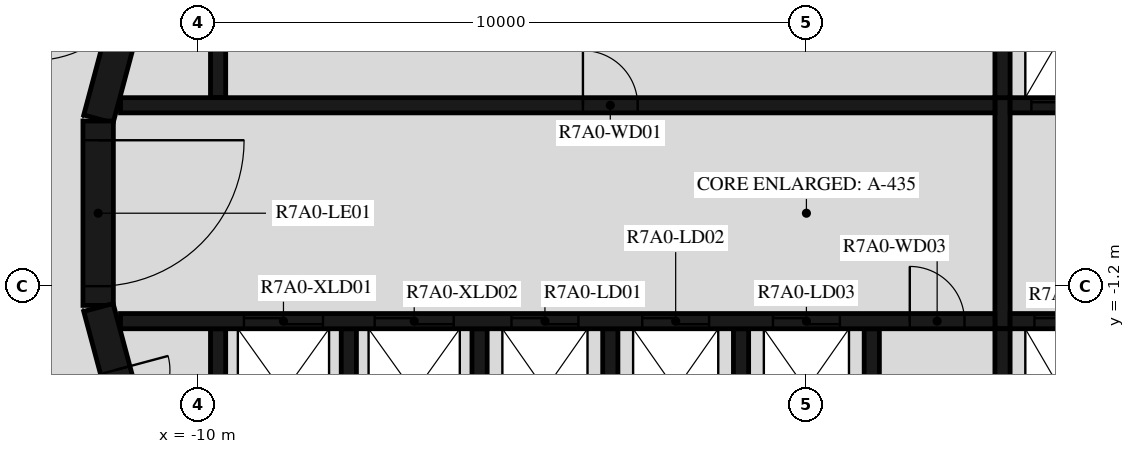
"""IFC4 building model, lengths in metres.
Left out: names, types, materials, properties, quantities, classifications, styles, units other than length and angle.
Written with IfcOpenShell. Run it as: python <this file> out.ifc"""

import sys

from ifc_helpers import new_model, si_unit, direction, frame, frame_2d, origin, place, context, subcontext, project, spatial, polyline, rectangle, outline, extrude, element, fill, save


model = new_model("IFC4")
c1 = context("Model", 3, precision=1e-05, world=origin(), true_north=direction((0.0, 1.0)))
c2 = subcontext(c1, "Body", "Model", "MODEL_VIEW")
j1 = project(units=[si_unit("LENGTHUNIT", "METRE"), si_unit("PLANEANGLEUNIT", "RADIAN")], contexts=[c1])
p1 = place(None, origin())
s1 = spatial("IfcSite", under=j1, at=p1, CompositionType="ELEMENT")
p2 = place(p1, origin())
s2 = spatial("IfcBuilding", under=s1, at=p2, CompositionType="ELEMENT")
p3 = place(p2, frame((0.0, 0.0, 263.4)))
s3 = spatial("IfcBuildingStorey", under=s2, at=p3, CompositionType="ELEMENT", Elevation=263.4)
p4 = place(p3, frame((-10.858, 4.479, 0.0), z_axis=(0.0, 0.0, 1.0), x_axis=(-0.258734743916, -0.965948410781, 0.0)))
e1 = element("IfcWall", 1, at=p4, inside=s3, PredefinedType="SHEAR", context=c2, shape_type="SweptSolid", body=[
    extrude(rectangle(XDim=3.033, YDim=0.5, at=frame_2d((1.516, 0.0))), origin(), (0.0, 0.0, 1.0), 3.12),
])
p5 = place(p3, frame((-11.647, 1.516, 0.0), z_axis=(0.0, 0.0, 1.0), x_axis=(0.0, -1.0, 0.0)))
e2 = element("IfcWall", 2, at=p5, inside=s3, PredefinedType="SHEAR", context=c2, shape_type="SweptSolid", body=[
    extrude(rectangle(XDim=3.033, YDim=0.5, at=frame_2d((1.516, 0.0))), origin(), (0.0, 0.0, 1.0), 3.12),
])
p6 = place(p5, frame((0.316, 0.0, 0.0)))
e3 = element("IfcOpeningElement", 3, at=p6, cuts=e2, PredefinedType="OPENING", context=c2, shape_type="SweptSolid", body=[
    extrude(rectangle(XDim=2.4, YDim=2.1, at=frame_2d((1.2, 1.05))), frame((0.0, 0.26, 0.0), z_axis=(0.0, -1.0, 0.0), x_axis=(1.0, 0.0, 0.0)), (0.0, 0.0, 1.0), 0.52),
])
p7 = place(p3, frame((-11.643, -1.55, 0.0), z_axis=(0.0, 0.0, 1.0), x_axis=(0.258734743916, -0.965948410781, 0.0)))
e4 = element("IfcWall", 4, at=p7, inside=s3, PredefinedType="SHEAR", context=c2, shape_type="SweptSolid", body=[
    extrude(rectangle(XDim=3.033, YDim=0.5, at=frame_2d((1.516, 0.0))), origin(), (0.0, 0.0, 1.0), 3.12),
])
p8 = place(p7, frame((1.066, 0.0, 0.0)))
e5 = element("IfcOpeningElement", 5, at=p8, cuts=e4, PredefinedType="OPENING", context=c2, shape_type="SweptSolid", body=[
    extrude(rectangle(XDim=0.9, YDim=2.1, at=frame_2d((0.45, 1.05))), frame((0.0, 0.26, 0.0), z_axis=(0.0, -1.0, 0.0), x_axis=(1.0, 0.0, 0.0)), (0.0, 0.0, 1.0), 0.52),
])
p9 = place(p3, origin())
e6 = element("IfcWall", 6, at=p9, inside=s3, PredefinedType="SHEAR", context=c2, shape_type="SweptSolid", body=[
    extrude(outline(polyline([(-9.8, 1.9), (-9.55, 1.9), (-9.55, 4.8), (3.1, 4.8), (3.1, 1.9), (3.35, 1.9), (3.35, 4.8), (5.25, 4.8), (5.25, 1.9), (5.5, 1.9), (5.5, 4.8), (7.4, 4.8), (7.4, 1.9), (7.65, 1.9), (7.65, 4.8), (9.55, 4.8), (9.55, 1.9), (9.8, 1.9), (9.8, 4.8), (9.8, 5.05), (-9.8, 5.05), (-9.8, 4.8), (-9.8, 1.9)])), origin(), (0.0, 0.0, 1.0), 3.12),
])
p10 = place(p3, origin())
e7 = element("IfcWall", 7, at=p10, inside=s3, PredefinedType="SHEAR", context=c2, shape_type="SweptSolid", body=[
    extrude(outline(polyline([(9.8, -5.05), (9.8, -4.8), (9.8, -1.9), (9.55, -1.9), (9.55, -4.8), (7.65, -4.8), (7.65, -1.9), (7.4, -1.9), (7.4, -4.8), (5.5, -4.8), (5.5, -1.9), (5.25, -1.9), (5.25, -4.8), (3.35, -4.8), (3.35, -1.9), (3.1, -1.9), (3.1, -4.8), (1.2, -4.8), (1.2, -1.9), (0.95, -1.9), (0.95, -4.8), (-0.95, -4.8), (-0.95, -1.9), (-1.2, -1.9), (-1.2, -4.8), (-3.1, -4.8), (-3.1, -1.9), (-3.35, -1.9), (-3.35, -4.8), (-5.25, -4.8), (-5.25, -1.9), (-5.5, -1.9), (-5.5, -4.8), (-7.4, -4.8), (-7.4, -1.9), (-7.65, -1.9), (-7.65, -4.8), (-9.55, -4.8), (-9.55, -1.9), (-9.8, -1.9), (-9.8, -4.8), (-9.8, -5.05), (9.8, -5.05)])), origin(), (0.0, 0.0, 1.0), 3.12),
])
p11 = place(p3, frame((-11.28, 1.775, 0.0), z_axis=(0.0, 0.0, 1.0), x_axis=(1.0, 0.0, 0.0)))
e8 = element("IfcWall", 8, at=p11, inside=s3, PredefinedType="SHEAR", context=c2, shape_type="SweptSolid", body=[
    extrude(rectangle(XDim=14.38, YDim=0.25, at=frame_2d((7.19, 0.0))), origin(), (0.0, 0.0, 1.0), 3.12),
])
p12 = place(p11, frame((7.605, 0.0, 0.0)))
e9 = element("IfcOpeningElement", 9, at=p12, cuts=e8, PredefinedType="OPENING", context=c2, shape_type="SweptSolid", body=[
    extrude(rectangle(XDim=0.9, YDim=2.1, at=frame_2d((0.45, 1.05))), frame((0.0, 0.135, 0.0), z_axis=(0.0, -1.0, 0.0), x_axis=(1.0, 0.0, 0.0)), (0.0, 0.0, 1.0), 0.27),
])
p13 = place(p3, frame((3.35, 1.775, 0.0), z_axis=(0.0, 0.0, 1.0), x_axis=(1.0, 0.0, 0.0)))
e10 = element("IfcWall", 10, at=p13, inside=s3, PredefinedType="SHEAR", context=c2, shape_type="SweptSolid", body=[
    extrude(rectangle(XDim=7.93, YDim=0.25, at=frame_2d((3.965, 0.0))), origin(), (0.0, 0.0, 1.0), 3.12),
])
p14 = place(p13, frame((0.35, 0.0, 0.0)))
e11 = element("IfcOpeningElement", 11, at=p14, cuts=e10, PredefinedType="OPENING", context=c2, shape_type="SweptSolid", body=[
    extrude(rectangle(XDim=1.2, YDim=2.4, at=frame_2d((0.6, 1.2))), frame((0.0, 0.135, 0.0), z_axis=(0.0, -1.0, 0.0), x_axis=(1.0, 0.0, 0.0)), (0.0, 0.0, 1.0), 0.27),
])
p15 = place(p13, frame((2.5, 0.0, 0.0)))
e12 = element("IfcOpeningElement", 12, at=p15, cuts=e10, PredefinedType="OPENING", context=c2, shape_type="SweptSolid", body=[
    extrude(rectangle(XDim=1.2, YDim=2.4, at=frame_2d((0.6, 1.2))), frame((0.0, 0.135, 0.0), z_axis=(0.0, -1.0, 0.0), x_axis=(1.0, 0.0, 0.0)), (0.0, 0.0, 1.0), 0.27),
])
p16 = place(p13, frame((4.8, 0.0, 0.0)))
e13 = element("IfcOpeningElement", 13, at=p16, cuts=e10, PredefinedType="OPENING", context=c2, shape_type="SweptSolid", body=[
    extrude(rectangle(XDim=0.9, YDim=2.1, at=frame_2d((0.45, 1.05))), frame((0.0, 0.135, 0.0), z_axis=(0.0, -1.0, 0.0), x_axis=(1.0, 0.0, 0.0)), (0.0, 0.0, 1.0), 0.27),
])
p17 = place(p3, frame((-11.28, -1.775, 0.0), z_axis=(0.0, 0.0, 1.0), x_axis=(1.0, 0.0, 0.0)))
e14 = element("IfcWall", 14, at=p17, inside=s3, PredefinedType="SHEAR", context=c2, shape_type="SweptSolid", body=[
    extrude(rectangle(XDim=14.38, YDim=0.25, at=frame_2d((7.19, 0.0))), origin(), (0.0, 0.0, 1.0), 3.12),
])
p18 = place(p17, frame((2.03, 0.0, 0.0)))
e15 = element("IfcOpeningElement", 15, at=p18, cuts=e14, PredefinedType="OPENING", context=c2, shape_type="SweptSolid", body=[
    extrude(rectangle(XDim=1.3, YDim=2.1, at=frame_2d((0.65, 1.05))), frame((0.0, 0.135, 0.0), z_axis=(0.0, -1.0, 0.0), x_axis=(1.0, 0.0, 0.0)), (0.0, 0.0, 1.0), 0.27),
])
p19 = place(p17, frame((4.18, 0.0, 0.0)))
e16 = element("IfcOpeningElement", 16, at=p19, cuts=e14, PredefinedType="OPENING", context=c2, shape_type="SweptSolid", body=[
    extrude(rectangle(XDim=1.3, YDim=2.1, at=frame_2d((0.65, 1.05))), frame((0.0, 0.135, 0.0), z_axis=(0.0, -1.0, 0.0), x_axis=(1.0, 0.0, 0.0)), (0.0, 0.0, 1.0), 0.27),
])
p20 = place(p17, frame((6.43, 0.0, 0.0)))
e17 = element("IfcOpeningElement", 17, at=p20, cuts=e14, PredefinedType="OPENING", context=c2, shape_type="SweptSolid", body=[
    extrude(rectangle(XDim=1.1, YDim=2.1, at=frame_2d((0.55, 1.05))), frame((0.0, 0.135, 0.0), z_axis=(0.0, -1.0, 0.0), x_axis=(1.0, 0.0, 0.0)), (0.0, 0.0, 1.0), 0.27),
])
p21 = place(p17, frame((8.58, 0.0, 0.0)))
e18 = element("IfcOpeningElement", 18, at=p21, cuts=e14, PredefinedType="OPENING", context=c2, shape_type="SweptSolid", body=[
    extrude(rectangle(XDim=1.1, YDim=2.1, at=frame_2d((0.55, 1.05))), frame((0.0, 0.135, 0.0), z_axis=(0.0, -1.0, 0.0), x_axis=(1.0, 0.0, 0.0)), (0.0, 0.0, 1.0), 0.27),
])
p22 = place(p17, frame((10.73, 0.0, 0.0)))
e19 = element("IfcOpeningElement", 19, at=p22, cuts=e14, PredefinedType="OPENING", context=c2, shape_type="SweptSolid", body=[
    extrude(rectangle(XDim=1.1, YDim=2.1, at=frame_2d((0.55, 1.05))), frame((0.0, 0.135, 0.0), z_axis=(0.0, -1.0, 0.0), x_axis=(1.0, 0.0, 0.0)), (0.0, 0.0, 1.0), 0.27),
])
p23 = place(p17, frame((12.98, 0.0, 0.0)))
e20 = element("IfcOpeningElement", 20, at=p23, cuts=e14, PredefinedType="OPENING", context=c2, shape_type="SweptSolid", body=[
    extrude(rectangle(XDim=0.9, YDim=2.1, at=frame_2d((0.45, 1.05))), frame((0.0, 0.135, 0.0), z_axis=(0.0, -1.0, 0.0), x_axis=(1.0, 0.0, 0.0)), (0.0, 0.0, 1.0), 0.27),
])
p24 = place(p3, frame((3.35, -1.775, 0.0), z_axis=(0.0, 0.0, 1.0), x_axis=(1.0, 0.0, 0.0)))
e21 = element("IfcWall", 21, at=p24, inside=s3, PredefinedType="SHEAR", context=c2, shape_type="SweptSolid", body=[
    extrude(rectangle(XDim=7.93, YDim=0.25, at=frame_2d((3.965, 0.0))), origin(), (0.0, 0.0, 1.0), 3.12),
])
p25 = place(p24, frame((0.4, 0.0, 0.0)))
e22 = element("IfcOpeningElement", 22, at=p25, cuts=e21, PredefinedType="OPENING", context=c2, shape_type="SweptSolid", body=[
    extrude(rectangle(XDim=1.1, YDim=2.4, at=frame_2d((0.55, 1.2))), frame((0.0, 0.135, 0.0), z_axis=(0.0, -1.0, 0.0), x_axis=(1.0, 0.0, 0.0)), (0.0, 0.0, 1.0), 0.27),
])
p26 = place(p24, frame((2.55, 0.0, 0.0)))
e23 = element("IfcOpeningElement", 23, at=p26, cuts=e21, PredefinedType="OPENING", context=c2, shape_type="SweptSolid", body=[
    extrude(rectangle(XDim=1.1, YDim=2.4, at=frame_2d((0.55, 1.2))), frame((0.0, 0.135, 0.0), z_axis=(0.0, -1.0, 0.0), x_axis=(1.0, 0.0, 0.0)), (0.0, 0.0, 1.0), 0.27),
])
p27 = place(p24, frame((4.7, 0.0, 0.0)))
e24 = element("IfcOpeningElement", 24, at=p27, cuts=e21, PredefinedType="OPENING", context=c2, shape_type="SweptSolid", body=[
    extrude(rectangle(XDim=1.1, YDim=2.4, at=frame_2d((0.55, 1.2))), frame((0.0, 0.135, 0.0), z_axis=(0.0, -1.0, 0.0), x_axis=(1.0, 0.0, 0.0)), (0.0, 0.0, 1.0), 0.27),
])
p28 = place(p3, frame((3.225, -1.9, 0.0), z_axis=(0.0, 0.0, 1.0), x_axis=(0.0, 1.0, 0.0)))
e25 = element("IfcWall", 25, at=p28, inside=s3, PredefinedType="SHEAR", context=c2, shape_type="SweptSolid", body=[
    extrude(rectangle(XDim=3.8, YDim=0.25, at=frame_2d((1.9, 0.0))), origin(), (0.0, 0.0, 1.0), 3.12),
])
p29 = place(p3, frame((-11.223, 8.154, 0.0), z_axis=(0.0, 0.0, 1.0), x_axis=(-0.358341090983, -0.93359073609, 0.0)))
e26 = element("IfcWall", 26, at=p29, inside=s3, PredefinedType="STANDARD", context=c2, shape_type="SweptSolid", body=[
    extrude(rectangle(XDim=7.181, YDim=0.2, at=frame_2d((3.59, 0.0))), origin(), (0.0, 0.0, 1.0), 3.12),
])
p30 = place(p29, frame((4.114, 0.0, 0.0)))
e27 = element("IfcOpeningElement", 27, at=p30, cuts=e26, PredefinedType="OPENING", context=c2, shape_type="SweptSolid", body=[
    extrude(rectangle(XDim=1.8, YDim=2.1, at=frame_2d((0.9, 1.05))), frame((0.0, 0.11, 0.0), z_axis=(0.0, -1.0, 0.0), x_axis=(1.0, 0.0, 0.0)), (0.0, 0.0, 1.0), 0.22),
])
p31 = place(p6, origin())
e28 = element("IfcDoor", 28, at=p31, inside=s3, OperationType="DOUBLE_DOOR_SINGLE_SWING", PredefinedType="DOOR", context=c2, shape_type="SweptSolid", body=[
    extrude(rectangle(XDim=2.4, YDim=2.1, at=frame_2d((1.2, 1.05))), frame((0.0, 0.025, 0.0), z_axis=(0.0, -1.0, 0.0), x_axis=(1.0, 0.0, 0.0)), (0.0, 0.0, 1.0), 0.05),
])
fill(e3, e28)
p32 = place(p14, origin())
e29 = element("IfcDoor", 29, at=p32, inside=s3, OperationType="DOUBLE_DOOR_SLIDING", PredefinedType="DOOR", context=c2, shape_type="SweptSolid", body=[
    extrude(rectangle(XDim=1.2, YDim=2.4, at=frame_2d((0.6, 1.2))), frame((0.0, 0.025, 0.0), z_axis=(0.0, -1.0, 0.0), x_axis=(1.0, 0.0, 0.0)), (0.0, 0.0, 1.0), 0.05),
])
fill(e11, e29)
p33 = place(p18, origin())
e30 = element("IfcDoor", 30, at=p33, inside=s3, OperationType="DOUBLE_DOOR_SLIDING", PredefinedType="DOOR", context=c2, shape_type="SweptSolid", body=[
    extrude(rectangle(XDim=1.3, YDim=2.1, at=frame_2d((0.65, 1.05))), frame((0.0, 0.025, 0.0), z_axis=(0.0, -1.0, 0.0), x_axis=(1.0, 0.0, 0.0)), (0.0, 0.0, 1.0), 0.05),
])
fill(e15, e30)
p34 = place(p19, origin())
e31 = element("IfcDoor", 31, at=p34, inside=s3, OperationType="DOUBLE_DOOR_SLIDING", PredefinedType="DOOR", context=c2, shape_type="SweptSolid", body=[
    extrude(rectangle(XDim=1.3, YDim=2.1, at=frame_2d((0.65, 1.05))), frame((0.0, 0.025, 0.0), z_axis=(0.0, -1.0, 0.0), x_axis=(1.0, 0.0, 0.0)), (0.0, 0.0, 1.0), 0.05),
])
fill(e16, e31)
p35 = place(p20, origin())
e32 = element("IfcDoor", 32, at=p35, inside=s3, OperationType="DOUBLE_DOOR_SLIDING", PredefinedType="DOOR", context=c2, shape_type="SweptSolid", body=[
    extrude(rectangle(XDim=1.1, YDim=2.1, at=frame_2d((0.55, 1.05))), frame((0.0, 0.025, 0.0), z_axis=(0.0, -1.0, 0.0), x_axis=(1.0, 0.0, 0.0)), (0.0, 0.0, 1.0), 0.05),
])
fill(e17, e32)
p36 = place(p21, origin())
e33 = element("IfcDoor", 33, at=p36, inside=s3, OperationType="DOUBLE_DOOR_SLIDING", PredefinedType="DOOR", context=c2, shape_type="SweptSolid", body=[
    extrude(rectangle(XDim=1.1, YDim=2.1, at=frame_2d((0.55, 1.05))), frame((0.0, 0.025, 0.0), z_axis=(0.0, -1.0, 0.0), x_axis=(1.0, 0.0, 0.0)), (0.0, 0.0, 1.0), 0.05),
])
fill(e18, e33)
p37 = place(p22, origin())
e34 = element("IfcDoor", 34, at=p37, inside=s3, OperationType="DOUBLE_DOOR_SLIDING", PredefinedType="DOOR", context=c2, shape_type="SweptSolid", body=[
    extrude(rectangle(XDim=1.1, YDim=2.1, at=frame_2d((0.55, 1.05))), frame((0.0, 0.025, 0.0), z_axis=(0.0, -1.0, 0.0), x_axis=(1.0, 0.0, 0.0)), (0.0, 0.0, 1.0), 0.05),
])
fill(e19, e34)
p38 = place(p25, origin())
e35 = element("IfcDoor", 35, at=p38, inside=s3, OperationType="DOUBLE_DOOR_SLIDING", PredefinedType="DOOR", context=c2, shape_type="SweptSolid", body=[
    extrude(rectangle(XDim=1.1, YDim=2.4, at=frame_2d((0.55, 1.2))), frame((0.0, 0.025, 0.0), z_axis=(0.0, -1.0, 0.0), x_axis=(1.0, 0.0, 0.0)), (0.0, 0.0, 1.0), 0.05),
])
fill(e22, e35)
p39 = place(p12, origin())
e36 = element("IfcDoor", 36, at=p39, inside=s3, OperationType="SINGLE_SWING_LEFT", PredefinedType="DOOR", context=c2, shape_type="SweptSolid", body=[
    extrude(rectangle(XDim=0.9, YDim=2.1, at=frame_2d((0.45, 1.05))), frame((0.0, 0.025, 0.0), z_axis=(0.0, -1.0, 0.0), x_axis=(1.0, 0.0, 0.0)), (0.0, 0.0, 1.0), 0.05),
])
fill(e9, e36)
p40 = place(p23, origin())
e37 = element("IfcDoor", 37, at=p40, inside=s3, OperationType="SINGLE_SWING_LEFT", PredefinedType="DOOR", context=c2, shape_type="SweptSolid", body=[
    extrude(rectangle(XDim=0.9, YDim=2.1, at=frame_2d((0.45, 1.05))), frame((0.0, 0.025, 0.0), z_axis=(0.0, -1.0, 0.0), x_axis=(1.0, 0.0, 0.0)), (0.0, 0.0, 1.0), 0.05),
])
fill(e20, e37)
p41 = place(p8, origin())
e38 = element("IfcDoor", 38, at=p41, inside=s3, OperationType="SINGLE_SWING_RIGHT", PredefinedType="DOOR", context=c2, shape_type="SweptSolid", body=[
    extrude(rectangle(XDim=0.9, YDim=2.1, at=frame_2d((0.45, 1.05))), frame((0.0, 0.025, 0.0), z_axis=(0.0, -1.0, 0.0), x_axis=(1.0, 0.0, 0.0)), (0.0, 0.0, 1.0), 0.05),
])
fill(e5, e38)
save(model, sys.argv[1])
